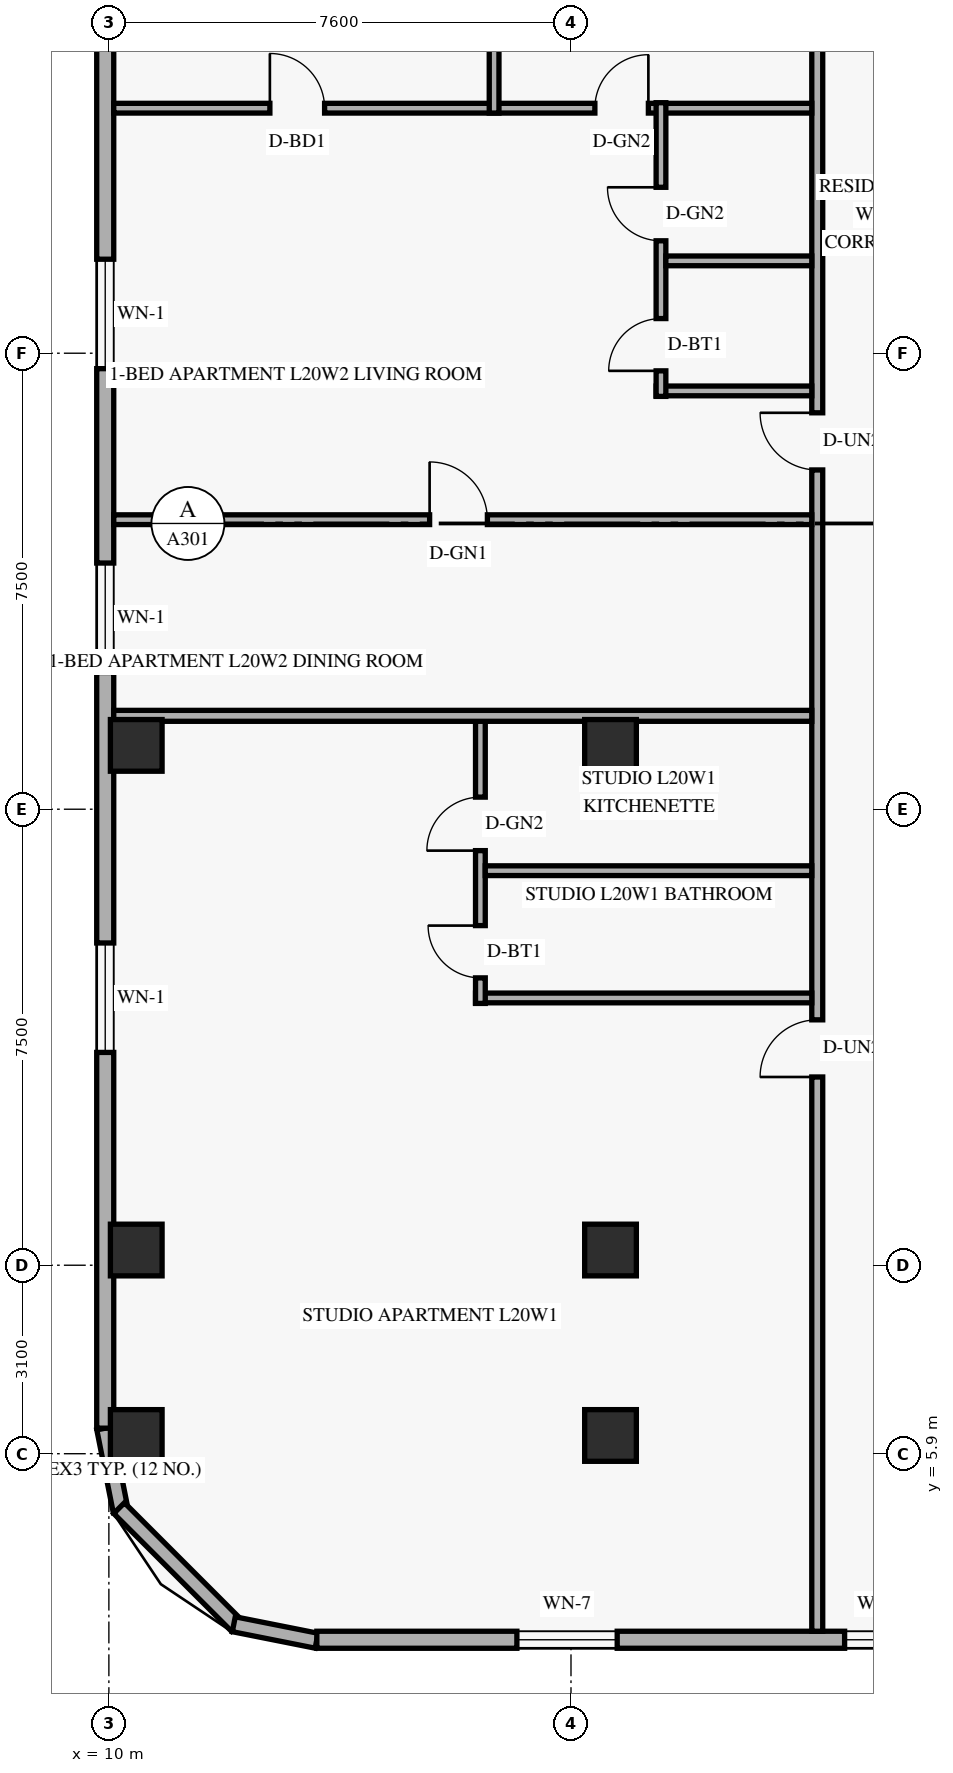
"""IFC4 building model, lengths in metres.
Left out: names, types, materials, properties, quantities, classifications, styles, units other than length and angle.
Written with IfcOpenShell. Run it as: python <this file> out.ifc"""

import sys

from ifc_helpers import new_model, si_unit, direction, frame, frame_2d, origin, origin_2d, place, context, subcontext, project, spatial, rectangle, extrude, element, fill, save


model = new_model("IFC4")
c1 = context("Model", 3, precision=1e-05, world=origin(), true_north=direction((0.0, 1.0)))
c2 = subcontext(c1, "Body", "Model", "MODEL_VIEW")
j1 = project(units=[si_unit("LENGTHUNIT", "METRE"), si_unit("PLANEANGLEUNIT", "RADIAN")], contexts=[c1])
p1 = place(None, origin())
s1 = spatial("IfcSite", under=j1, at=p1, CompositionType="ELEMENT")
p2 = place(p1, origin())
s2 = spatial("IfcBuilding", under=s1, at=p2, CompositionType="ELEMENT")
p3 = place(p2, frame((0.0, 0.0, 80.4)))
s3 = spatial("IfcBuildingStorey", under=s2, at=p3, CompositionType="ELEMENT", Elevation=80.4)
for number, where, z_axis, x_axis in (
    (1, (10.45, 6.2, 0.0), (0.0, 0.0, 1.0), (1.0, 0.0, 0.0)),
    (2, (10.45, 9.25, 0.0), (0.0, 0.0, 1.0), (1.0, 0.0, 0.0)),
    (3, (10.45, 17.55, 0.0), (0.0, 0.0, 1.0), (1.0, 0.0, 0.0)),
    (4, (18.25, 6.2, 0.0), (0.0, 0.0, 1.0), (1.0, 0.0, 0.0)),
    (5, (18.25, 9.25, 0.0), (0.0, 0.0, 1.0), (1.0, 0.0, 0.0)),
    (6, (18.25, 17.55, 0.0), (0.0, 0.0, 1.0), (1.0, 0.0, 0.0)),
):
    element("IfcColumn", number, at=place(p3, frame(where, z_axis=z_axis, x_axis=x_axis)), inside=s3, PredefinedType="COLUMN", context=c2, shape_type="SweptSolid", body=[
        extrude(rectangle(XDim=0.85, YDim=0.85, at=origin_2d()), origin(), (0.0, 0.0, 1.0), 3.6),
    ])
p4 = place(p3, frame((9.924, 6.316, 0.0), z_axis=(0.0, 0.0, 1.0), x_axis=(0.195000137217, -0.980803214965, 0.0)))
e7 = element("IfcWall", 7, at=p4, inside=s3, PredefinedType="SOLIDWALL", context=c2, shape_type="SweptSolid", body=[
    extrude(rectangle(XDim=1.388, YDim=0.25, at=frame_2d((0.694, 0.0))), origin(), (0.0, 0.0, 1.0), 3.36),
])
p5 = place(p3, frame((10.168, 5.005, 0.0), z_axis=(0.0, 0.0, 1.0), x_axis=(0.707151344399, -0.707062215165, 0.0)))
e8 = element("IfcWall", 8, at=p5, inside=s3, PredefinedType="SOLIDWALL", context=c2, shape_type="SweptSolid", body=[
    extrude(rectangle(XDim=2.739, YDim=0.25, at=frame_2d((1.37, 0.0))), origin(), (0.0, 0.0, 1.0), 3.36),
])
p6 = place(p3, frame((12.054, 3.095, 0.0), z_axis=(0.0, 0.0, 1.0), x_axis=(0.980809899341, -0.19496651342, 0.0)))
e9 = element("IfcWall", 9, at=p6, inside=s3, PredefinedType="SOLIDWALL", context=c2, shape_type="SweptSolid", body=[
    extrude(rectangle(XDim=1.389, YDim=0.25, at=frame_2d((0.694, 0.0))), origin(), (0.0, 0.0, 1.0), 3.36),
])
p7 = place(p3, frame((13.42, 2.84, 0.0), z_axis=(0.0, 0.0, 1.0), x_axis=(1.0, 0.0, 0.0)))
e10 = element("IfcWall", 10, at=p7, inside=s3, PredefinedType="SOLIDWALL", context=c2, shape_type="SweptSolid", body=[
    extrude(rectangle(XDim=36.56, YDim=0.28, at=frame_2d((18.28, 0.0))), origin(), (0.0, 0.0, 1.0), 3.36),
])
p8 = place(p7, frame((3.29, 0.0, 0.85)))
e11 = element("IfcOpeningElement", 11, at=p8, cuts=e10, PredefinedType="OPENING", context=c2, shape_type="SweptSolid", body=[
    extrude(rectangle(XDim=1.65, YDim=1.6, at=frame_2d((0.825, 0.8))), frame((0.0, 0.15, 0.0), z_axis=(0.0, -1.0, 0.0), x_axis=(1.0, 0.0, 0.0)), (0.0, 0.0, 1.0), 0.3),
])
p9 = place(p7, frame((8.68, 0.0, 0.85)))
e12 = element("IfcOpeningElement", 12, at=p9, cuts=e10, PredefinedType="OPENING", context=c2, shape_type="SweptSolid", body=[
    extrude(rectangle(XDim=1.2, YDim=1.5, at=frame_2d((0.6, 0.75))), frame((0.0, 0.15, 0.0), z_axis=(0.0, -1.0, 0.0), x_axis=(1.0, 0.0, 0.0)), (0.0, 0.0, 1.0), 0.3),
])
p10 = place(p7, frame((11.956, 0.0, 0.85)))
e13 = element("IfcOpeningElement", 13, at=p10, cuts=e10, PredefinedType="OPENING", context=c2, shape_type="SweptSolid", body=[
    extrude(rectangle(XDim=1.65, YDim=1.6, at=frame_2d((0.825, 0.8))), frame((0.0, 0.15, 0.0), z_axis=(0.0, -1.0, 0.0), x_axis=(1.0, 0.0, 0.0)), (0.0, 0.0, 1.0), 0.3),
])
p11 = place(p7, frame((17.791, 0.0, 0.85)))
e14 = element("IfcOpeningElement", 14, at=p11, cuts=e10, PredefinedType="OPENING", context=c2, shape_type="SweptSolid", body=[
    extrude(rectangle(XDim=1.65, YDim=1.6, at=frame_2d((0.825, 0.8))), frame((0.0, 0.15, 0.0), z_axis=(0.0, -1.0, 0.0), x_axis=(1.0, 0.0, 0.0)), (0.0, 0.0, 1.0), 0.3),
])
p12 = place(p7, frame((22.465, 0.0, 0.85)))
e15 = element("IfcOpeningElement", 15, at=p12, cuts=e10, PredefinedType="OPENING", context=c2, shape_type="SweptSolid", body=[
    extrude(rectangle(XDim=1.2, YDim=1.5, at=frame_2d((0.6, 0.75))), frame((0.0, 0.15, 0.0), z_axis=(0.0, -1.0, 0.0), x_axis=(1.0, 0.0, 0.0)), (0.0, 0.0, 1.0), 0.3),
])
p13 = place(p7, frame((29.52, 0.0, 0.85)))
e16 = element("IfcOpeningElement", 16, at=p13, cuts=e10, PredefinedType="OPENING", context=c2, shape_type="SweptSolid", body=[
    extrude(rectangle(XDim=1.65, YDim=1.6, at=frame_2d((0.825, 0.8))), frame((0.0, 0.15, 0.0), z_axis=(0.0, -1.0, 0.0), x_axis=(1.0, 0.0, 0.0)), (0.0, 0.0, 1.0), 0.3),
])
p14 = place(p3, frame((9.94, 41.68, 0.0), z_axis=(0.0, 0.0, 1.0), x_axis=(0.0, -1.0, 0.0)))
e17 = element("IfcWall", 17, at=p14, inside=s3, PredefinedType="SOLIDWALL", context=c2, shape_type="SweptSolid", body=[
    extrude(rectangle(XDim=35.36, YDim=0.28, at=frame_2d((17.68, 0.0))), origin(), (0.0, 0.0, 1.0), 3.36),
])
p15 = place(p14, frame((27.38, 0.0, 0.85)))
e18 = element("IfcOpeningElement", 18, at=p15, cuts=e17, PredefinedType="OPENING", context=c2, shape_type="SweptSolid", body=[
    extrude(rectangle(XDim=1.8, YDim=1.6, at=frame_2d((0.9, 0.8))), frame((0.0, 0.15, 0.0), z_axis=(0.0, -1.0, 0.0), x_axis=(1.0, 0.0, 0.0)), (0.0, 0.0, 1.0), 0.3),
])
p16 = place(p14, frame((21.131, 0.0, 0.85)))
e19 = element("IfcOpeningElement", 19, at=p16, cuts=e17, PredefinedType="OPENING", context=c2, shape_type="SweptSolid", body=[
    extrude(rectangle(XDim=1.8, YDim=1.6, at=frame_2d((0.9, 0.8))), frame((0.0, 0.15, 0.0), z_axis=(0.0, -1.0, 0.0), x_axis=(1.0, 0.0, 0.0)), (0.0, 0.0, 1.0), 0.3),
])
p17 = place(p14, frame((16.134, 0.0, 0.85)))
e20 = element("IfcOpeningElement", 20, at=p17, cuts=e17, PredefinedType="OPENING", context=c2, shape_type="SweptSolid", body=[
    extrude(rectangle(XDim=1.8, YDim=1.6, at=frame_2d((0.9, 0.8))), frame((0.0, 0.15, 0.0), z_axis=(0.0, -1.0, 0.0), x_axis=(1.0, 0.0, 0.0)), (0.0, 0.0, 1.0), 0.3),
])
p18 = place(p14, frame((9.5, 0.0, 0.85)))
e21 = element("IfcOpeningElement", 21, at=p18, cuts=e17, PredefinedType="OPENING", context=c2, shape_type="SweptSolid", body=[
    extrude(rectangle(XDim=1.2, YDim=1.5, at=frame_2d((0.6, 0.75))), frame((0.0, 0.15, 0.0), z_axis=(0.0, -1.0, 0.0), x_axis=(1.0, 0.0, 0.0)), (0.0, 0.0, 1.0), 0.3),
])
p19 = place(p14, frame((5.365, 0.0, 0.85)))
e22 = element("IfcOpeningElement", 22, at=p19, cuts=e17, PredefinedType="OPENING", context=c2, shape_type="SweptSolid", body=[
    extrude(rectangle(XDim=1.8, YDim=1.6, at=frame_2d((0.9, 0.8))), frame((0.0, 0.15, 0.0), z_axis=(0.0, -1.0, 0.0), x_axis=(1.0, 0.0, 0.0)), (0.0, 0.0, 1.0), 0.3),
])
p20 = place(p3, frame((21.65, 2.98, 0.0), z_axis=(0.0, 0.0, 1.0), x_axis=(0.0, 1.0, 0.0)))
e23 = element("IfcWall", 23, at=p20, inside=s3, PredefinedType="STANDARD", context=c2, shape_type="SweptSolid", body=[
    extrude(rectangle(XDim=42.04, YDim=0.18, at=frame_2d((21.02, 0.0))), origin(), (0.0, 0.0, 1.0), 2.731),
])
p21 = place(p20, frame((9.116, 0.0, 0.0)))
e24 = element("IfcOpeningElement", 24, at=p21, cuts=e23, PredefinedType="OPENING", context=c2, shape_type="SweptSolid", body=[
    extrude(rectangle(XDim=0.94, YDim=2.15, at=frame_2d((0.47, 1.075))), frame((0.0, 0.1, 0.0), z_axis=(0.0, -1.0, 0.0), x_axis=(1.0, 0.0, 0.0)), (0.0, 0.0, 1.0), 0.2),
])
p22 = place(p20, frame((19.1, 0.0, 0.0)))
e25 = element("IfcOpeningElement", 25, at=p22, cuts=e23, PredefinedType="OPENING", context=c2, shape_type="SweptSolid", body=[
    extrude(rectangle(XDim=0.94, YDim=2.15, at=frame_2d((0.47, 1.075))), frame((0.0, 0.1, 0.0), z_axis=(0.0, -1.0, 0.0), x_axis=(1.0, 0.0, 0.0)), (0.0, 0.0, 1.0), 0.2),
])
p23 = place(p20, frame((32.201, 0.0, 0.0)))
e26 = element("IfcOpeningElement", 26, at=p23, cuts=e23, PredefinedType="OPENING", context=c2, shape_type="SweptSolid", body=[
    extrude(rectangle(XDim=0.94, YDim=2.15, at=frame_2d((0.47, 1.075))), frame((0.0, 0.1, 0.0), z_axis=(0.0, -1.0, 0.0), x_axis=(1.0, 0.0, 0.0)), (0.0, 0.0, 1.0), 0.2),
])
p24 = place(p3, frame((16.03, 13.396, 0.0), z_axis=(0.0, 0.0, 1.0), x_axis=(1.0, 0.0, 0.0)))
e27 = element("IfcWall", 27, at=p24, inside=s3, PredefinedType="PLUMBINGWALL", context=c2, shape_type="SweptSolid", body=[
    extrude(rectangle(XDim=5.53, YDim=0.16, at=frame_2d((2.765, 0.0))), origin(), (0.0, 0.0, 1.0), 2.731),
])
p25 = place(p3, frame((16.11, 13.306, 0.0), z_axis=(0.0, 0.0, 1.0), x_axis=(0.0, 1.0, 0.0)))
e28 = element("IfcWall", 28, at=p25, inside=s3, PredefinedType="PLUMBINGWALL", context=c2, shape_type="SweptSolid", body=[
    extrude(rectangle(XDim=4.73, YDim=0.16, at=frame_2d((2.365, 0.0))), origin(), (0.0, 0.0, 1.0), 2.731),
])
p26 = place(p25, frame((0.42, 0.0, 0.0)))
e29 = element("IfcOpeningElement", 29, at=p26, cuts=e28, PredefinedType="OPENING", context=c2, shape_type="SweptSolid", body=[
    extrude(rectangle(XDim=0.86, YDim=2.12, at=frame_2d((0.43, 1.06))), frame((0.0, 0.09, 0.0), z_axis=(0.0, -1.0, 0.0), x_axis=(1.0, 0.0, 0.0)), (0.0, 0.0, 1.0), 0.18),
])
p27 = place(p25, frame((2.513, 0.0, 0.0)))
e30 = element("IfcOpeningElement", 30, at=p27, cuts=e28, PredefinedType="OPENING", context=c2, shape_type="SweptSolid", body=[
    extrude(rectangle(XDim=0.88, YDim=2.12, at=frame_2d((0.44, 1.06))), frame((0.0, 0.09, 0.0), z_axis=(0.0, -1.0, 0.0), x_axis=(1.0, 0.0, 0.0)), (0.0, 0.0, 1.0), 0.18),
])
p28 = place(p3, frame((16.19, 15.489, 0.0), z_axis=(0.0, 0.0, 1.0), x_axis=(1.0, 0.0, 0.0)))
e31 = element("IfcWall", 31, at=p28, inside=s3, PredefinedType="PLUMBINGWALL", context=c2, shape_type="SweptSolid", body=[
    extrude(rectangle(XDim=5.37, YDim=0.16, at=frame_2d((2.685, 0.0))), origin(), (0.0, 0.0, 1.0), 2.731),
])
p29 = place(p3, frame((10.08, 18.036, 0.0), z_axis=(0.0, 0.0, 1.0), x_axis=(1.0, 0.0, 0.0)))
e32 = element("IfcWall", 32, at=p29, inside=s3, PredefinedType="PARTITIONING", context=c2, shape_type="SweptSolid", body=[
    extrude(rectangle(XDim=11.48, YDim=0.18, at=frame_2d((5.74, 0.0))), origin(), (0.0, 0.0, 1.0), 2.731),
])
p30 = place(p3, frame((10.08, 28.03, 0.0), z_axis=(0.0, 0.0, 1.0), x_axis=(1.0, 0.0, 0.0)))
e33 = element("IfcWall", 33, at=p30, inside=s3, PredefinedType="PARTITIONING", context=c2, shape_type="SweptSolid", body=[
    extrude(rectangle(XDim=11.48, YDim=0.16, at=frame_2d((5.74, 0.0))), origin(), (0.0, 0.0, 1.0), 2.731),
])
p31 = place(p30, frame((7.913, 0.0, 0.0)))
e34 = element("IfcOpeningElement", 34, at=p31, cuts=e33, PredefinedType="OPENING", context=c2, shape_type="SweptSolid", body=[
    extrude(rectangle(XDim=0.88, YDim=2.12, at=frame_2d((0.44, 1.06))), frame((0.0, 0.09, 0.0), z_axis=(0.0, -1.0, 0.0), x_axis=(1.0, 0.0, 0.0)), (0.0, 0.0, 1.0), 0.18),
])
p32 = place(p30, frame((2.568, 0.0, 0.0)))
e35 = element("IfcOpeningElement", 35, at=p32, cuts=e33, PredefinedType="OPENING", context=c2, shape_type="SweptSolid", body=[
    extrude(rectangle(XDim=0.9, YDim=2.14, at=frame_2d((0.45, 1.07))), frame((0.0, 0.09, 0.0), z_axis=(0.0, -1.0, 0.0), x_axis=(1.0, 0.0, 0.0)), (0.0, 0.0, 1.0), 0.18),
])
p33 = place(p3, frame((19.0, 23.38, 0.0), z_axis=(0.0, 0.0, 1.0), x_axis=(1.0, 0.0, 0.0)))
e36 = element("IfcWall", 36, at=p33, inside=s3, PredefinedType="PLUMBINGWALL", context=c2, shape_type="SweptSolid", body=[
    extrude(rectangle(XDim=2.56, YDim=0.16, at=frame_2d((1.28, 0.0))), origin(), (0.0, 0.0, 1.0), 3.36),
])
p34 = place(p3, frame((19.08, 23.29, 0.0), z_axis=(0.0, 0.0, 1.0), x_axis=(0.0, 1.0, 0.0)))
e37 = element("IfcWall", 37, at=p34, inside=s3, PredefinedType="PLUMBINGWALL", context=c2, shape_type="SweptSolid", body=[
    extrude(rectangle(XDim=4.83, YDim=0.16, at=frame_2d((2.415, 0.0))), origin(), (0.0, 0.0, 1.0), 3.36),
])
p35 = place(p34, frame((0.42, 0.0, 0.0)))
e38 = element("IfcOpeningElement", 38, at=p35, cuts=e37, PredefinedType="OPENING", context=c2, shape_type="SweptSolid", body=[
    extrude(rectangle(XDim=0.86, YDim=2.12, at=frame_2d((0.43, 1.06))), frame((0.0, 0.09, 0.0), z_axis=(0.0, -1.0, 0.0), x_axis=(1.0, 0.0, 0.0)), (0.0, 0.0, 1.0), 0.18),
])
p36 = place(p34, frame((2.559, 0.0, 0.0)))
e39 = element("IfcOpeningElement", 39, at=p36, cuts=e37, PredefinedType="OPENING", context=c2, shape_type="SweptSolid", body=[
    extrude(rectangle(XDim=0.88, YDim=2.12, at=frame_2d((0.44, 1.06))), frame((0.0, 0.09, 0.0), z_axis=(0.0, -1.0, 0.0), x_axis=(1.0, 0.0, 0.0)), (0.0, 0.0, 1.0), 0.18),
])
p37 = place(p3, frame((19.16, 25.519, 0.0), z_axis=(0.0, 0.0, 1.0), x_axis=(1.0, 0.0, 0.0)))
e40 = element("IfcWall", 40, at=p37, inside=s3, PredefinedType="PLUMBINGWALL", context=c2, shape_type="SweptSolid", body=[
    extrude(rectangle(XDim=2.4, YDim=0.16, at=frame_2d((1.2, 0.0))), origin(), (0.0, 0.0, 1.0), 3.36),
])
p38 = place(p3, frame((10.08, 21.262, 0.0), z_axis=(0.0, 0.0, 1.0), x_axis=(1.0, 0.0, 0.0)))
e41 = element("IfcWall", 41, at=p38, inside=s3, PredefinedType="PARTITIONING", context=c2, shape_type="SweptSolid", body=[
    extrude(rectangle(XDim=11.48, YDim=0.16, at=frame_2d((5.74, 0.0))), origin(), (0.0, 0.0, 1.0), 2.731),
])
p39 = place(p38, frame((5.195, 0.0, 0.0)))
e42 = element("IfcOpeningElement", 42, at=p39, cuts=e41, PredefinedType="OPENING", context=c2, shape_type="SweptSolid", body=[
    extrude(rectangle(XDim=0.95, YDim=2.15, at=frame_2d((0.475, 1.075))), frame((0.0, 0.09, 0.0), z_axis=(0.0, -1.0, 0.0), x_axis=(1.0, 0.0, 0.0)), (0.0, 0.0, 1.0), 0.18),
])
p40 = place(p3, frame((16.335, 27.95, 0.0), z_axis=(0.0, 0.0, 1.0), x_axis=(0.0, 1.0, 0.0)))
e43 = element("IfcWall", 43, at=p40, inside=s3, PredefinedType="PARTITIONING", context=c2, shape_type="SweptSolid", body=[
    extrude(rectangle(XDim=4.96, YDim=0.16, at=frame_2d((2.48, 0.0))), origin(), (0.0, 0.0, 1.0), 2.731),
])
p41 = place(p8, origin())
e44 = element("IfcWindow", 44, at=p41, inside=s3, PartitioningType="SINGLE_PANEL", PredefinedType="WINDOW", context=c2, shape_type="SweptSolid", body=[
    extrude(rectangle(XDim=1.65, YDim=1.6, at=frame_2d((0.825, 0.8))), frame((0.0, 0.03, 0.0), z_axis=(0.0, -1.0, 0.0), x_axis=(1.0, 0.0, 0.0)), (0.0, 0.0, 1.0), 0.06),
])
fill(e11, e44)
p42 = place(p9, origin())
e45 = element("IfcWindow", 45, at=p42, inside=s3, PartitioningType="SINGLE_PANEL", PredefinedType="WINDOW", context=c2, shape_type="SweptSolid", body=[
    extrude(rectangle(XDim=1.2, YDim=1.5, at=frame_2d((0.6, 0.75))), frame((0.0, 0.03, 0.0), z_axis=(0.0, -1.0, 0.0), x_axis=(1.0, 0.0, 0.0)), (0.0, 0.0, 1.0), 0.06),
])
fill(e12, e45)
p43 = place(p15, origin())
e46 = element("IfcWindow", 46, at=p43, inside=s3, PartitioningType="SINGLE_PANEL", PredefinedType="WINDOW", context=c2, shape_type="SweptSolid", body=[
    extrude(rectangle(XDim=1.8, YDim=1.6, at=frame_2d((0.9, 0.8))), frame((0.0, 0.03, 0.0), z_axis=(0.0, -1.0, 0.0), x_axis=(1.0, 0.0, 0.0)), (0.0, 0.0, 1.0), 0.06),
])
fill(e18, e46)
p44 = place(p16, origin())
e47 = element("IfcWindow", 47, at=p44, inside=s3, PartitioningType="SINGLE_PANEL", PredefinedType="WINDOW", context=c2, shape_type="SweptSolid", body=[
    extrude(rectangle(XDim=1.8, YDim=1.6, at=frame_2d((0.9, 0.8))), frame((0.0, 0.03, 0.0), z_axis=(0.0, -1.0, 0.0), x_axis=(1.0, 0.0, 0.0)), (0.0, 0.0, 1.0), 0.06),
])
fill(e19, e47)
p45 = place(p17, origin())
e48 = element("IfcWindow", 48, at=p45, inside=s3, PartitioningType="SINGLE_PANEL", PredefinedType="WINDOW", context=c2, shape_type="SweptSolid", body=[
    extrude(rectangle(XDim=1.8, YDim=1.6, at=frame_2d((0.9, 0.8))), frame((0.0, 0.03, 0.0), z_axis=(0.0, -1.0, 0.0), x_axis=(1.0, 0.0, 0.0)), (0.0, 0.0, 1.0), 0.06),
])
fill(e20, e48)
p46 = place(p21, origin())
e49 = element("IfcDoor", 49, at=p46, inside=s3, OperationType="SINGLE_SWING_LEFT", PredefinedType="DOOR", context=c2, shape_type="SweptSolid", body=[
    extrude(rectangle(XDim=0.94, YDim=2.15, at=frame_2d((0.47, 1.075))), frame((0.0, 0.025, 0.0), z_axis=(0.0, -1.0, 0.0), x_axis=(1.0, 0.0, 0.0)), (0.0, 0.0, 1.0), 0.05),
])
fill(e24, e49)
p47 = place(p26, origin())
e50 = element("IfcDoor", 50, at=p47, inside=s3, OperationType="SINGLE_SWING_RIGHT", PredefinedType="DOOR", context=c2, shape_type="SweptSolid", body=[
    extrude(rectangle(XDim=0.86, YDim=2.12, at=frame_2d((0.43, 1.06))), frame((0.0, 0.025, 0.0), z_axis=(0.0, -1.0, 0.0), x_axis=(1.0, 0.0, 0.0)), (0.0, 0.0, 1.0), 0.05),
])
fill(e29, e50)
p48 = place(p27, origin())
e51 = element("IfcDoor", 51, at=p48, inside=s3, OperationType="SINGLE_SWING_LEFT", PredefinedType="DOOR", context=c2, shape_type="SweptSolid", body=[
    extrude(rectangle(XDim=0.88, YDim=2.12, at=frame_2d((0.44, 1.06))), frame((0.0, 0.025, 0.0), z_axis=(0.0, -1.0, 0.0), x_axis=(1.0, 0.0, 0.0)), (0.0, 0.0, 1.0), 0.05),
])
fill(e30, e51)
p49 = place(p39, origin())
e52 = element("IfcDoor", 52, at=p49, inside=s3, OperationType="SINGLE_SWING_LEFT", PredefinedType="DOOR", context=c2, shape_type="SweptSolid", body=[
    extrude(rectangle(XDim=0.95, YDim=2.15, at=frame_2d((0.475, 1.075))), frame((0.0, 0.025, 0.0), z_axis=(0.0, -1.0, 0.0), x_axis=(1.0, 0.0, 0.0)), (0.0, 0.0, 1.0), 0.05),
])
fill(e42, e52)
p50 = place(p22, origin())
e53 = element("IfcDoor", 53, at=p50, inside=s3, OperationType="SINGLE_SWING_RIGHT", PredefinedType="DOOR", context=c2, shape_type="SweptSolid", body=[
    extrude(rectangle(XDim=0.94, YDim=2.15, at=frame_2d((0.47, 1.075))), frame((0.0, 0.025, 0.0), z_axis=(0.0, -1.0, 0.0), x_axis=(1.0, 0.0, 0.0)), (0.0, 0.0, 1.0), 0.05),
])
fill(e25, e53)
p51 = place(p35, origin())
e54 = element("IfcDoor", 54, at=p51, inside=s3, OperationType="SINGLE_SWING_LEFT", PredefinedType="DOOR", context=c2, shape_type="SweptSolid", body=[
    extrude(rectangle(XDim=0.86, YDim=2.12, at=frame_2d((0.43, 1.06))), frame((0.0, 0.025, 0.0), z_axis=(0.0, -1.0, 0.0), x_axis=(1.0, 0.0, 0.0)), (0.0, 0.0, 1.0), 0.05),
])
fill(e38, e54)
p52 = place(p36, origin())
e55 = element("IfcDoor", 55, at=p52, inside=s3, OperationType="SINGLE_SWING_RIGHT", PredefinedType="DOOR", context=c2, shape_type="SweptSolid", body=[
    extrude(rectangle(XDim=0.88, YDim=2.12, at=frame_2d((0.44, 1.06))), frame((0.0, 0.025, 0.0), z_axis=(0.0, -1.0, 0.0), x_axis=(1.0, 0.0, 0.0)), (0.0, 0.0, 1.0), 0.05),
])
fill(e39, e55)
p53 = place(p31, origin())
e56 = element("IfcDoor", 56, at=p53, inside=s3, OperationType="SINGLE_SWING_RIGHT", PredefinedType="DOOR", context=c2, shape_type="SweptSolid", body=[
    extrude(rectangle(XDim=0.88, YDim=2.12, at=frame_2d((0.44, 1.06))), frame((0.0, 0.025, 0.0), z_axis=(0.0, -1.0, 0.0), x_axis=(1.0, 0.0, 0.0)), (0.0, 0.0, 1.0), 0.05),
])
fill(e34, e56)
p54 = place(p32, origin())
e57 = element("IfcDoor", 57, at=p54, inside=s3, OperationType="SINGLE_SWING_LEFT", PredefinedType="DOOR", context=c2, shape_type="SweptSolid", body=[
    extrude(rectangle(XDim=0.9, YDim=2.14, at=frame_2d((0.45, 1.07))), frame((0.0, 0.025, 0.0), z_axis=(0.0, -1.0, 0.0), x_axis=(1.0, 0.0, 0.0)), (0.0, 0.0, 1.0), 0.05),
])
fill(e35, e57)
save(model, sys.argv[1])
